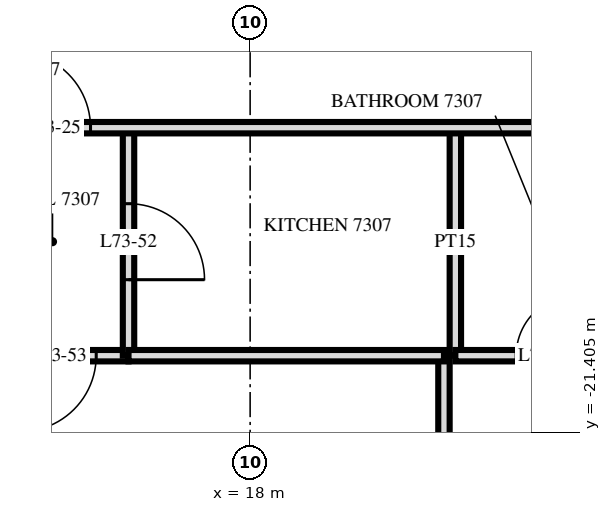
"""IFC4 building model, lengths in metres.
Left out: names, types, materials, properties, quantities, classifications, styles, units other than length and angle.
Written with IfcOpenShell. Run it as: python <this file> out.ifc"""

import sys

from ifc_helpers import new_model, si_unit, direction, frame, frame_2d, origin, place, context, subcontext, project, spatial, rectangle, extrude, element, fill, save


model = new_model("IFC4")
c1 = context("Model", 3, precision=1e-05, world=origin(), true_north=direction((0.0, 1.0)))
c2 = subcontext(c1, "Body", "Model", "MODEL_VIEW")
j1 = project(units=[si_unit("LENGTHUNIT", "METRE"), si_unit("PLANEANGLEUNIT", "RADIAN")], contexts=[c1])
p1 = place(None, origin())
s1 = spatial("IfcSite", under=j1, at=p1, CompositionType="ELEMENT")
p2 = place(p1, origin())
s2 = spatial("IfcBuilding", under=s1, at=p2, CompositionType="ELEMENT")
p3 = place(p2, frame((0.0, 0.0, 277.1)))
s3 = spatial("IfcBuildingStorey", under=s2, at=p3, CompositionType="ELEMENT", Elevation=277.1)
p4 = place(p3, frame((20.7, -20.4, 0.0), z_axis=(0.0, 0.0, 1.0), x_axis=(0.0, 1.0, 0.0)))
e1 = element("IfcWall", 1, at=p4, inside=s3, PredefinedType="PARTITIONING", context=c2, shape_type="SweptSolid", body=[
    extrude(rectangle(XDim=3.0, YDim=0.15, at=frame_2d((1.5, 0.0))), origin(), (0.0, 0.0, 1.0), 3.22),
])
p5 = place(p3, frame((20.55, -33.017, 0.0), z_axis=(0.0, 0.0, 1.0), x_axis=(0.0, 1.0, 0.0)))
e2 = element("IfcWall", 2, at=p5, inside=s3, PredefinedType="PARTITIONING", context=c2, shape_type="SweptSolid", body=[
    extrude(rectangle(XDim=12.617, YDim=0.15, at=frame_2d((6.308, 0.0))), origin(), (0.0, 0.0, 1.0), 3.22),
])
p6 = place(p5, frame((5.697, 0.0, 0.0)))
e3 = element("IfcOpeningElement", 3, at=p6, cuts=e2, PredefinedType="OPENING", context=c2, shape_type="SweptSolid", body=[
    extrude(rectangle(XDim=0.9, YDim=2.1, at=frame_2d((0.45, 1.05))), frame((0.0, 0.085, 0.0), z_axis=(0.0, -1.0, 0.0), x_axis=(1.0, 0.0, 0.0)), (0.0, 0.0, 1.0), 0.17),
])
p7 = place(p3, frame((16.4, -20.4, 0.0), z_axis=(0.0, 0.0, 1.0), x_axis=(0.0, 1.0, 0.0)))
e4 = element("IfcWall", 4, at=p7, inside=s3, PredefinedType="PARTITIONING", context=c2, shape_type="SweptSolid", body=[
    extrude(rectangle(XDim=3.0, YDim=0.15, at=frame_2d((1.5, 0.0))), origin(), (0.0, 0.0, 1.0), 3.22),
])
p8 = place(p7, frame((1.0, 0.0, 0.0)))
e5 = element("IfcOpeningElement", 5, at=p8, cuts=e4, PredefinedType="OPENING", context=c2, shape_type="SweptSolid", body=[
    extrude(rectangle(XDim=1.0, YDim=2.1, at=frame_2d((0.5, 1.05))), frame((0.0, 0.085, 0.0), z_axis=(0.0, -1.0, 0.0), x_axis=(1.0, 0.0, 0.0)), (0.0, 0.0, 1.0), 0.17),
])
p9 = place(p3, frame((14.55, -20.4, 0.0), z_axis=(0.0, 0.0, 1.0), x_axis=(1.0, 0.0, 0.0)))
e6 = element("IfcWall", 6, at=p9, inside=s3, PredefinedType="PARTITIONING", context=c2, shape_type="SweptSolid", body=[
    extrude(rectangle(XDim=1.85, YDim=0.15, at=frame_2d((0.925, 0.0))), origin(), (0.0, 0.0, 1.0), 3.22),
])
p10 = place(p9, frame((0.425, 0.0, 0.0)))
e7 = element("IfcOpeningElement", 7, at=p10, cuts=e6, PredefinedType="OPENING", context=c2, shape_type="SweptSolid", body=[
    extrude(rectangle(XDim=1.0, YDim=2.1, at=frame_2d((0.5, 1.05))), frame((0.0, 0.085, 0.0), z_axis=(0.0, -1.0, 0.0), x_axis=(1.0, 0.0, 0.0)), (0.0, 0.0, 1.0), 0.17),
])
p11 = place(p3, frame((16.4, -20.4, 0.0), z_axis=(0.0, 0.0, 1.0), x_axis=(1.0, 0.0, 0.0)))
e8 = element("IfcWall", 8, at=p11, inside=s3, PredefinedType="PARTITIONING", context=c2, shape_type="SweptSolid", body=[
    extrude(rectangle(XDim=4.15, YDim=0.15, at=frame_2d((2.075, 0.0))), origin(), (0.0, 0.0, 1.0), 3.22),
])
p12 = place(p3, frame((20.7, -20.4, 0.0), z_axis=(0.0, 0.0, 1.0), x_axis=(1.0, 0.0, 0.0)))
e9 = element("IfcWall", 9, at=p12, inside=s3, PredefinedType="PARTITIONING", context=c2, shape_type="SweptSolid", body=[
    extrude(rectangle(XDim=2.22, YDim=0.15, at=frame_2d((1.11, 0.0))), origin(), (0.0, 0.0, 1.0), 3.22),
])
p13 = place(p12, frame((0.8, 0.0, 0.0)))
e10 = element("IfcOpeningElement", 10, at=p13, cuts=e9, PredefinedType="OPENING", context=c2, shape_type="SweptSolid", body=[
    extrude(rectangle(XDim=0.8, YDim=2.1, at=frame_2d((0.4, 1.05))), frame((0.0, 0.085, 0.0), z_axis=(0.0, -1.0, 0.0), x_axis=(1.0, 0.0, 0.0)), (0.0, 0.0, 1.0), 0.17),
])
p14 = place(p3, frame((-22.92, -17.4, 0.0), z_axis=(0.0, 0.0, 1.0), x_axis=(1.0, 0.0, 0.0)))
e11 = element("IfcWall", 11, at=p14, inside=s3, PredefinedType="PARTITIONING", context=c2, shape_type="SweptSolid", body=[
    extrude(rectangle(XDim=45.84, YDim=0.15, at=frame_2d((22.92, 0.0))), origin(), (0.0, 0.0, 1.0), 3.22),
])
p15 = place(p14, frame((21.67, 0.0, 0.0)))
e12 = element("IfcOpeningElement", 12, at=p15, cuts=e11, PredefinedType="OPENING", context=c2, shape_type="SweptSolid", body=[
    extrude(rectangle(XDim=1.0, YDim=2.1, at=frame_2d((0.5, 1.05))), frame((0.0, 0.085, 0.0), z_axis=(0.0, -1.0, 0.0), x_axis=(1.0, 0.0, 0.0)), (0.0, 0.0, 1.0), 0.17),
])
p16 = place(p14, frame((24.77, 0.0, 0.0)))
e13 = element("IfcOpeningElement", 13, at=p16, cuts=e11, PredefinedType="OPENING", context=c2, shape_type="SweptSolid", body=[
    extrude(rectangle(XDim=1.0, YDim=2.1, at=frame_2d((0.5, 1.05))), frame((0.0, 0.085, 0.0), z_axis=(0.0, -1.0, 0.0), x_axis=(1.0, 0.0, 0.0)), (0.0, 0.0, 1.0), 0.17),
])
p17 = place(p14, frame((26.07, 0.0, 0.0)))
e14 = element("IfcOpeningElement", 14, at=p17, cuts=e11, PredefinedType="OPENING", context=c2, shape_type="SweptSolid", body=[
    extrude(rectangle(XDim=1.0, YDim=2.1, at=frame_2d((0.5, 1.05))), frame((0.0, 0.085, 0.0), z_axis=(0.0, -1.0, 0.0), x_axis=(1.0, 0.0, 0.0)), (0.0, 0.0, 1.0), 0.17),
])
p18 = place(p14, frame((30.77, 0.0, 0.0)))
e15 = element("IfcOpeningElement", 15, at=p18, cuts=e11, PredefinedType="OPENING", context=c2, shape_type="SweptSolid", body=[
    extrude(rectangle(XDim=1.0, YDim=2.1, at=frame_2d((0.5, 1.05))), frame((0.0, 0.085, 0.0), z_axis=(0.0, -1.0, 0.0), x_axis=(1.0, 0.0, 0.0)), (0.0, 0.0, 1.0), 0.17),
])
p19 = place(p14, frame((32.07, 0.0, 0.0)))
e16 = element("IfcOpeningElement", 16, at=p19, cuts=e11, PredefinedType="OPENING", context=c2, shape_type="SweptSolid", body=[
    extrude(rectangle(XDim=1.0, YDim=2.1, at=frame_2d((0.5, 1.05))), frame((0.0, 0.085, 0.0), z_axis=(0.0, -1.0, 0.0), x_axis=(1.0, 0.0, 0.0)), (0.0, 0.0, 1.0), 0.17),
])
p20 = place(p14, frame((9.42, 0.0, 0.0)))
e17 = element("IfcOpeningElement", 17, at=p20, cuts=e11, PredefinedType="OPENING", context=c2, shape_type="SweptSolid", body=[
    extrude(rectangle(XDim=1.0, YDim=2.1, at=frame_2d((0.5, 1.05))), frame((0.0, 0.085, 0.0), z_axis=(0.0, -1.0, 0.0), x_axis=(1.0, 0.0, 0.0)), (0.0, 0.0, 1.0), 0.17),
])
p21 = place(p14, frame((2.67, 0.0, 0.0)))
e18 = element("IfcOpeningElement", 18, at=p21, cuts=e11, PredefinedType="OPENING", context=c2, shape_type="SweptSolid", body=[
    extrude(rectangle(XDim=1.0, YDim=2.1, at=frame_2d((0.5, 1.05))), frame((0.0, 0.085, 0.0), z_axis=(0.0, -1.0, 0.0), x_axis=(1.0, 0.0, 0.0)), (0.0, 0.0, 1.0), 0.17),
])
p22 = place(p14, frame((37.82, 0.0, 0.0)))
e19 = element("IfcOpeningElement", 19, at=p22, cuts=e11, PredefinedType="OPENING", context=c2, shape_type="SweptSolid", body=[
    extrude(rectangle(XDim=1.0, YDim=2.1, at=frame_2d((0.5, 1.05))), frame((0.0, 0.085, 0.0), z_axis=(0.0, -1.0, 0.0), x_axis=(1.0, 0.0, 0.0)), (0.0, 0.0, 1.0), 0.17),
])
p23 = place(p22, origin())
e20 = element("IfcDoor", 20, at=p23, inside=s3, OperationType="SINGLE_SWING_RIGHT", PredefinedType="DOOR", context=c2, shape_type="SweptSolid", body=[
    extrude(rectangle(XDim=1.0, YDim=2.1, at=frame_2d((0.5, 1.05))), frame((0.0, 0.025, 0.0), z_axis=(0.0, -1.0, 0.0), x_axis=(1.0, 0.0, 0.0)), (0.0, 0.0, 1.0), 0.05),
])
fill(e19, e20)
p24 = place(p8, frame((0.5, 0.0, 0.0), z_axis=(0.0, 0.0, 1.0), x_axis=(-1.0, 0.0, 0.0)))
e21 = element("IfcDoor", 21, at=p24, inside=s3, OperationType="SINGLE_SWING_LEFT", PredefinedType="DOOR", context=c2, shape_type="SweptSolid", body=[
    extrude(rectangle(XDim=1.0, YDim=2.1, at=frame_2d((0.0, 1.05))), frame((0.0, -0.025, 0.0), z_axis=(0.0, 1.0, 0.0), x_axis=(-1.0, 0.0, 0.0)), (0.0, 0.0, 1.0), 0.05),
])
fill(e5, e21)
p25 = place(p10, frame((0.5, 0.0, 0.0), z_axis=(0.0, 0.0, 1.0), x_axis=(-1.0, 0.0, 0.0)))
e22 = element("IfcDoor", 22, at=p25, inside=s3, OperationType="SINGLE_SWING_LEFT", PredefinedType="DOOR", context=c2, shape_type="SweptSolid", body=[
    extrude(rectangle(XDim=1.0, YDim=2.1, at=frame_2d((0.0, 1.05))), frame((0.0, -0.025, 0.0), z_axis=(0.0, 1.0, 0.0), x_axis=(-1.0, 0.0, 0.0)), (0.0, 0.0, 1.0), 0.05),
])
fill(e7, e22)
p26 = place(p13, origin())
e23 = element("IfcDoor", 23, at=p26, inside=s3, OperationType="SINGLE_SWING_LEFT", PredefinedType="DOOR", context=c2, shape_type="SweptSolid", body=[
    extrude(rectangle(XDim=0.8, YDim=2.1, at=frame_2d((0.4, 1.05))), frame((0.0, 0.025, 0.0), z_axis=(0.0, -1.0, 0.0), x_axis=(1.0, 0.0, 0.0)), (0.0, 0.0, 1.0), 0.05),
])
fill(e10, e23)
save(model, sys.argv[1])
